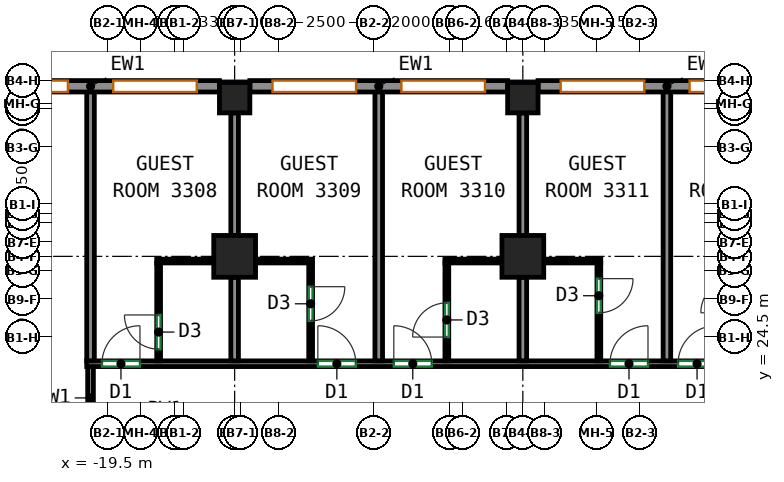
"""IFC4 building model, lengths in metres.
Left out: names, types, materials, properties, quantities, classifications, styles, units other than length and angle.
Written with IfcOpenShell. Run it as: python <this file> out.ifc"""

import sys

from ifc_helpers import new_model, si_unit, direction, frame, frame_2d, origin, origin_2d, place, context, subcontext, project, spatial, rectangle, extrude, source, transform, mapped, element, fill, save


model = new_model("IFC4")
c1 = context("Model", 3, precision=1e-05, world=origin(), true_north=direction((0.0, 1.0)))
c2 = subcontext(c1, "Body", "Model", "MODEL_VIEW")
j1 = project(units=[si_unit("LENGTHUNIT", "METRE"), si_unit("PLANEANGLEUNIT", "RADIAN")], contexts=[c1])
p1 = place(None, origin())
s1 = spatial("IfcSite", under=j1, at=p1, CompositionType="ELEMENT")
p2 = place(p1, origin())
s2 = spatial("IfcBuilding", under=s1, at=p2, CompositionType="ELEMENT")
p3 = place(p2, frame((0.0, 0.0, 147.3)))
s3 = spatial("IfcBuildingStorey", under=s2, at=p3, CompositionType="ELEMENT", Elevation=147.3)
m1 = source(origin(), c2, "Body", "SweptSolid", [
    extrude(rectangle(XDim=1.1, YDim=1.1, at=origin_2d()), origin(), (0.0, 0.0, 1.0), 3.12),
])
p4 = place(p3, frame((-16.167, 26.625, 0.0), z_axis=(0.0, 0.0, 1.0), x_axis=(1.0, 0.0, 0.0)))
e1 = element("IfcColumn", 1, at=p4, inside=s3, PredefinedType="COLUMN", context=c2, shape_type="MappedRepresentation", body=[
    mapped(m1, transform((0.0, 0.0, 0.0))),
])
m2 = source(origin(), c2, "Body", "SweptSolid", [
    extrude(rectangle(XDim=0.8, YDim=0.8, at=origin_2d()), origin(), (0.0, 0.0, 1.0), 3.12),
])
p5 = place(p3, frame((-16.167, 30.8, 0.0), z_axis=(0.0, 0.0, 1.0), x_axis=(1.0, 0.0, 0.0)))
e2 = element("IfcColumn", 2, at=p5, inside=s3, PredefinedType="COLUMN", context=c2, shape_type="MappedRepresentation", body=[
    mapped(m2, transform((0.0, 0.0, 0.0))),
])
p6 = place(p3, frame((-8.583, 26.625, 0.0), z_axis=(0.0, 0.0, 1.0), x_axis=(1.0, 0.0, 0.0)))
e3 = element("IfcColumn", 3, at=p6, inside=s3, PredefinedType="COLUMN", context=c2, shape_type="MappedRepresentation", body=[
    mapped(m1, transform((0.0, 0.0, 0.0))),
])
p7 = place(p3, frame((-8.583, 30.8, 0.0), z_axis=(0.0, 0.0, 1.0), x_axis=(1.0, 0.0, 0.0)))
e4 = element("IfcColumn", 4, at=p7, inside=s3, PredefinedType="COLUMN", context=c2, shape_type="MappedRepresentation", body=[
    mapped(m2, transform((0.0, 0.0, 0.0))),
])
m3 = source(origin(), c2, "Body", "SweptSolid", [
    extrude(rectangle(XDim=6.783, YDim=0.3, at=frame_2d((3.392, 0.0))), origin(), (0.0, 0.0, 1.0), 3.12),
])
p8 = place(p3, frame((-1.4, 31.1, 0.0), z_axis=(0.0, 0.0, 1.0), x_axis=(-1.0, 0.0, 0.0)))
e5 = element("IfcWall", 5, at=p8, inside=s3, PredefinedType="SOLIDWALL", context=c2, shape_type="MappedRepresentation", body=[
    mapped(m3, transform((0.0, 0.0, 0.0))),
])
p9 = place(p8, frame((0.596, 0.0, 0.85)))
e6 = element("IfcOpeningElement", 6, at=p9, cuts=e5, PredefinedType="OPENING", context=c2, shape_type="SweptSolid", body=[
    extrude(rectangle(XDim=2.2, YDim=1.95, at=frame_2d((1.1, 0.975))), frame((0.0, 0.16, 0.0), z_axis=(0.0, -1.0, 0.0), x_axis=(1.0, 0.0, 0.0)), (0.0, 0.0, 1.0), 0.32),
])
p10 = place(p8, frame((3.988, 0.0, 0.85)))
e7 = element("IfcOpeningElement", 7, at=p10, cuts=e5, PredefinedType="OPENING", context=c2, shape_type="SweptSolid", body=[
    extrude(rectangle(XDim=2.2, YDim=1.95, at=frame_2d((1.1, 0.975))), frame((0.0, 0.16, 0.0), z_axis=(0.0, -1.0, 0.0), x_axis=(1.0, 0.0, 0.0)), (0.0, 0.0, 1.0), 0.32),
])
m4 = source(origin(), c2, "Body", "SweptSolid", [
    extrude(rectangle(XDim=6.783, YDim=0.3, at=frame_2d((3.392, 0.0))), origin(), (0.0, 0.0, 1.0), 3.12),
])
p11 = place(p3, frame((-8.983, 31.1, 0.0), z_axis=(0.0, 0.0, 1.0), x_axis=(-1.0, 0.0, 0.0)))
e8 = element("IfcWall", 8, at=p11, inside=s3, PredefinedType="SOLIDWALL", context=c2, shape_type="MappedRepresentation", body=[
    mapped(m4, transform((0.0, 0.0, 0.0))),
])
p12 = place(p11, frame((0.596, 0.0, 0.85)))
e9 = element("IfcOpeningElement", 9, at=p12, cuts=e8, PredefinedType="OPENING", context=c2, shape_type="SweptSolid", body=[
    extrude(rectangle(XDim=2.2, YDim=1.95, at=frame_2d((1.1, 0.975))), frame((0.0, 0.16, 0.0), z_axis=(0.0, -1.0, 0.0), x_axis=(1.0, 0.0, 0.0)), (0.0, 0.0, 1.0), 0.32),
])
p13 = place(p11, frame((3.988, 0.0, 0.85)))
e10 = element("IfcOpeningElement", 10, at=p13, cuts=e8, PredefinedType="OPENING", context=c2, shape_type="SweptSolid", body=[
    extrude(rectangle(XDim=2.2, YDim=1.95, at=frame_2d((1.1, 0.975))), frame((0.0, 0.16, 0.0), z_axis=(0.0, -1.0, 0.0), x_axis=(1.0, 0.0, 0.0)), (0.0, 0.0, 1.0), 0.32),
])
p14 = place(p3, frame((-16.567, 31.1, 0.0), z_axis=(0.0, 0.0, 1.0), x_axis=(-1.0, 0.0, 0.0)))
e11 = element("IfcWall", 11, at=p14, inside=s3, PredefinedType="SOLIDWALL", context=c2, shape_type="MappedRepresentation", body=[
    mapped(m3, transform((0.0, 0.0, 0.0))),
])
p15 = place(p14, frame((0.596, 0.0, 0.85)))
e12 = element("IfcOpeningElement", 12, at=p15, cuts=e11, PredefinedType="OPENING", context=c2, shape_type="SweptSolid", body=[
    extrude(rectangle(XDim=2.2, YDim=1.95, at=frame_2d((1.1, 0.975))), frame((0.0, 0.16, 0.0), z_axis=(0.0, -1.0, 0.0), x_axis=(1.0, 0.0, 0.0)), (0.0, 0.0, 1.0), 0.32),
])
p16 = place(p14, frame((3.988, 0.0, 0.85)))
e13 = element("IfcOpeningElement", 13, at=p16, cuts=e11, PredefinedType="OPENING", context=c2, shape_type="SweptSolid", body=[
    extrude(rectangle(XDim=2.2, YDim=1.95, at=frame_2d((1.1, 0.975))), frame((0.0, 0.16, 0.0), z_axis=(0.0, -1.0, 0.0), x_axis=(1.0, 0.0, 0.0)), (0.0, 0.0, 1.0), 0.32),
])
p17 = place(p3, frame((-19.959, 22.075, 0.0), z_axis=(0.0, 0.0, 1.0), x_axis=(0.0, 1.0, 0.0)))
e14 = element("IfcWall", 14, at=p17, inside=s3, PredefinedType="PARTITIONING", context=c2, shape_type="SweptSolid", body=[
    extrude(rectangle(XDim=1.65, YDim=0.15, at=frame_2d((0.825, 0.0))), origin(), (0.0, 0.0, 1.0), 3.12),
])
p18 = place(p3, frame((-20.059, 23.8, 0.0), z_axis=(0.0, 0.0, 1.0), x_axis=(1.0, 0.0, 0.0)))
e15 = element("IfcWall", 15, at=p18, inside=s3, PredefinedType="PARTITIONING", context=c2, shape_type="SweptSolid", body=[
    extrude(rectangle(XDim=41.909, YDim=0.15, at=frame_2d((20.955, 0.0))), origin(), (0.0, 0.0, 1.0), 3.12),
])
p19 = place(p18, frame((0.401, 0.0, 0.0)))
e16 = element("IfcOpeningElement", 16, at=p19, cuts=e15, PredefinedType="OPENING", context=c2, shape_type="SweptSolid", body=[
    extrude(rectangle(XDim=1.0, YDim=2.1, at=frame_2d((0.5, 1.05))), frame((0.0, 0.085, 0.0), z_axis=(0.0, -1.0, 0.0), x_axis=(1.0, 0.0, 0.0)), (0.0, 0.0, 1.0), 0.17),
])
p20 = place(p18, frame((6.082, 0.0, 0.0)))
e17 = element("IfcOpeningElement", 17, at=p20, cuts=e15, PredefinedType="OPENING", context=c2, shape_type="SweptSolid", body=[
    extrude(rectangle(XDim=1.0, YDim=2.1, at=frame_2d((0.5, 1.05))), frame((0.0, 0.085, 0.0), z_axis=(0.0, -1.0, 0.0), x_axis=(1.0, 0.0, 0.0)), (0.0, 0.0, 1.0), 0.17),
])
p21 = place(p18, frame((8.08, 0.0, 0.0)))
e18 = element("IfcOpeningElement", 18, at=p21, cuts=e15, PredefinedType="OPENING", context=c2, shape_type="SweptSolid", body=[
    extrude(rectangle(XDim=1.0, YDim=2.1, at=frame_2d((0.5, 1.05))), frame((0.0, 0.085, 0.0), z_axis=(0.0, -1.0, 0.0), x_axis=(1.0, 0.0, 0.0)), (0.0, 0.0, 1.0), 0.17),
])
p22 = place(p18, frame((13.769, 0.0, 0.0)))
e19 = element("IfcOpeningElement", 19, at=p22, cuts=e15, PredefinedType="OPENING", context=c2, shape_type="SweptSolid", body=[
    extrude(rectangle(XDim=1.0, YDim=2.1, at=frame_2d((0.5, 1.05))), frame((0.0, 0.085, 0.0), z_axis=(0.0, -1.0, 0.0), x_axis=(1.0, 0.0, 0.0)), (0.0, 0.0, 1.0), 0.17),
])
p23 = place(p18, frame((15.56, 0.0, 0.0)))
e20 = element("IfcOpeningElement", 20, at=p23, cuts=e15, PredefinedType="OPENING", context=c2, shape_type="SweptSolid", body=[
    extrude(rectangle(XDim=1.0, YDim=2.1, at=frame_2d((0.5, 1.05))), frame((0.0, 0.085, 0.0), z_axis=(0.0, -1.0, 0.0), x_axis=(1.0, 0.0, 0.0)), (0.0, 0.0, 1.0), 0.17),
])
p24 = place(p18, frame((21.625, 0.0, 0.0)))
e21 = element("IfcOpeningElement", 21, at=p24, cuts=e15, PredefinedType="OPENING", context=c2, shape_type="SweptSolid", body=[
    extrude(rectangle(XDim=1.0, YDim=2.1, at=frame_2d((0.5, 1.05))), frame((0.0, 0.085, 0.0), z_axis=(0.0, -1.0, 0.0), x_axis=(1.0, 0.0, 0.0)), (0.0, 0.0, 1.0), 0.17),
])
p25 = place(p18, frame((23.212, 0.0, 0.0)))
e22 = element("IfcOpeningElement", 22, at=p25, cuts=e15, PredefinedType="OPENING", context=c2, shape_type="SweptSolid", body=[
    extrude(rectangle(XDim=1.0, YDim=2.1, at=frame_2d((0.5, 1.05))), frame((0.0, 0.085, 0.0), z_axis=(0.0, -1.0, 0.0), x_axis=(1.0, 0.0, 0.0)), (0.0, 0.0, 1.0), 0.17),
])
p26 = place(p18, frame((29.038, 0.0, 0.0)))
e23 = element("IfcOpeningElement", 23, at=p26, cuts=e15, PredefinedType="OPENING", context=c2, shape_type="SweptSolid", body=[
    extrude(rectangle(XDim=1.0, YDim=2.1, at=frame_2d((0.5, 1.05))), frame((0.0, 0.085, 0.0), z_axis=(0.0, -1.0, 0.0), x_axis=(1.0, 0.0, 0.0)), (0.0, 0.0, 1.0), 0.17),
])
p27 = place(p18, frame((30.624, 0.0, 0.0)))
e24 = element("IfcOpeningElement", 24, at=p27, cuts=e15, PredefinedType="OPENING", context=c2, shape_type="SweptSolid", body=[
    extrude(rectangle(XDim=1.0, YDim=2.1, at=frame_2d((0.5, 1.05))), frame((0.0, 0.085, 0.0), z_axis=(0.0, -1.0, 0.0), x_axis=(1.0, 0.0, 0.0)), (0.0, 0.0, 1.0), 0.17),
])
p28 = place(p18, frame((36.622, 0.0, 0.0)))
e25 = element("IfcOpeningElement", 25, at=p28, cuts=e15, PredefinedType="OPENING", context=c2, shape_type="SweptSolid", body=[
    extrude(rectangle(XDim=1.0, YDim=2.1, at=frame_2d((0.5, 1.05))), frame((0.0, 0.085, 0.0), z_axis=(0.0, -1.0, 0.0), x_axis=(1.0, 0.0, 0.0)), (0.0, 0.0, 1.0), 0.17),
])
p29 = place(p18, frame((38.516, 0.0, 0.0)))
e26 = element("IfcOpeningElement", 26, at=p29, cuts=e15, PredefinedType="OPENING", context=c2, shape_type="SweptSolid", body=[
    extrude(rectangle(XDim=1.0, YDim=2.1, at=frame_2d((0.5, 1.05))), frame((0.0, 0.085, 0.0), z_axis=(0.0, -1.0, 0.0), x_axis=(1.0, 0.0, 0.0)), (0.0, 0.0, 1.0), 0.17),
])
p30 = place(p3, frame((-19.959, 23.877, 0.0), z_axis=(0.0, 0.0, 1.0), x_axis=(0.0, 1.0, 0.0)))
e27 = element("IfcWall", 27, at=p30, inside=s3, PredefinedType="PARTITIONING", context=c2, shape_type="SweptSolid", body=[
    extrude(rectangle(XDim=7.123, YDim=0.2, at=frame_2d((3.562, 0.0))), origin(), (0.0, 0.0, 1.0), 3.12),
])
p31 = place(p3, frame((-18.217, 26.502, 0.0), z_axis=(0.0, 0.0, 1.0), x_axis=(1.0, 0.0, 0.0)))
e28 = element("IfcWall", 28, at=p31, inside=s3, PredefinedType="PARTITIONING", context=c2, shape_type="SweptSolid", body=[
    extrude(rectangle(XDim=1.5, YDim=0.1, at=frame_2d((0.75, 0.0))), origin(), (0.0, 0.0, 1.0), 3.12),
])
p32 = place(p3, frame((-18.167, 23.877, 0.0), z_axis=(0.0, 0.0, 1.0), x_axis=(0.0, 1.0, 0.0)))
e29 = element("IfcWall", 29, at=p32, inside=s3, PredefinedType="PARTITIONING", context=c2, shape_type="SweptSolid", body=[
    extrude(rectangle(XDim=2.575, YDim=0.1, at=frame_2d((1.288, 0.0))), origin(), (0.0, 0.0, 1.0), 3.12),
])
p33 = place(p32, frame((0.306, 0.0, 0.0)))
e30 = element("IfcOpeningElement", 30, at=p33, cuts=e29, PredefinedType="OPENING", context=c2, shape_type="SweptSolid", body=[
    extrude(rectangle(XDim=0.9, YDim=2.1, at=frame_2d((0.45, 1.05))), frame((0.0, 0.06, 0.0), z_axis=(0.0, -1.0, 0.0), x_axis=(1.0, 0.0, 0.0)), (0.0, 0.0, 1.0), 0.12),
])
p34 = place(p3, frame((-16.167, 27.175, 0.0), z_axis=(0.0, 0.0, 1.0), x_axis=(0.0, 1.0, 0.0)))
e31 = element("IfcWall", 31, at=p34, inside=s3, PredefinedType="PARTITIONING", context=c2, shape_type="SweptSolid", body=[
    extrude(rectangle(XDim=3.225, YDim=0.2, at=frame_2d((1.612, 0.0))), origin(), (0.0, 0.0, 1.0), 3.12),
])
p35 = place(p3, frame((-16.167, 23.877, 0.0), z_axis=(0.0, 0.0, 1.0), x_axis=(0.0, 1.0, 0.0)))
e32 = element("IfcWall", 32, at=p35, inside=s3, PredefinedType="PARTITIONING", context=c2, shape_type="SweptSolid", body=[
    extrude(rectangle(XDim=2.198, YDim=0.2, at=frame_2d((1.099, 0.0))), origin(), (0.0, 0.0, 1.0), 3.12),
])
p36 = place(p3, frame((-15.617, 26.502, 0.0), z_axis=(0.0, 0.0, 1.0), x_axis=(1.0, 0.0, 0.0)))
e33 = element("IfcWall", 33, at=p36, inside=s3, PredefinedType="PARTITIONING", context=c2, shape_type="SweptSolid", body=[
    extrude(rectangle(XDim=1.5, YDim=0.1, at=frame_2d((0.75, 0.0))), origin(), (0.0, 0.0, 1.0), 3.12),
])
p37 = place(p3, frame((-14.167, 26.452, 0.0), z_axis=(0.0, 0.0, 1.0), x_axis=(0.0, -1.0, 0.0)))
e34 = element("IfcWall", 34, at=p37, inside=s3, PredefinedType="PARTITIONING", context=c2, shape_type="SweptSolid", body=[
    extrude(rectangle(XDim=2.575, YDim=0.1, at=frame_2d((1.288, 0.0))), origin(), (0.0, 0.0, 1.0), 3.12),
])
p38 = place(p37, frame((0.625, 0.0, 0.0)))
e35 = element("IfcOpeningElement", 35, at=p38, cuts=e34, PredefinedType="OPENING", context=c2, shape_type="SweptSolid", body=[
    extrude(rectangle(XDim=0.9, YDim=2.1, at=frame_2d((0.45, 1.05))), frame((0.0, 0.06, 0.0), z_axis=(0.0, -1.0, 0.0), x_axis=(1.0, 0.0, 0.0)), (0.0, 0.0, 1.0), 0.12),
])
p39 = place(p3, frame((-12.375, 23.877, 0.0), z_axis=(0.0, 0.0, 1.0), x_axis=(0.0, 1.0, 0.0)))
e36 = element("IfcWall", 36, at=p39, inside=s3, PredefinedType="PARTITIONING", context=c2, shape_type="SweptSolid", body=[
    extrude(rectangle(XDim=7.123, YDim=0.2, at=frame_2d((3.562, 0.0))), origin(), (0.0, 0.0, 1.0), 3.12),
])
p40 = place(p3, frame((-10.633, 26.502, 0.0), z_axis=(0.0, 0.0, 1.0), x_axis=(1.0, 0.0, 0.0)))
e37 = element("IfcWall", 37, at=p40, inside=s3, PredefinedType="PARTITIONING", context=c2, shape_type="SweptSolid", body=[
    extrude(rectangle(XDim=1.5, YDim=0.1, at=frame_2d((0.75, 0.0))), origin(), (0.0, 0.0, 1.0), 3.12),
])
p41 = place(p3, frame((-10.583, 23.877, 0.0), z_axis=(0.0, 0.0, 1.0), x_axis=(0.0, 1.0, 0.0)))
e38 = element("IfcWall", 38, at=p41, inside=s3, PredefinedType="PARTITIONING", context=c2, shape_type="SweptSolid", body=[
    extrude(rectangle(XDim=2.575, YDim=0.1, at=frame_2d((1.288, 0.0))), origin(), (0.0, 0.0, 1.0), 3.12),
])
p42 = place(p41, frame((0.625, 0.0, 0.0)))
e39 = element("IfcOpeningElement", 39, at=p42, cuts=e38, PredefinedType="OPENING", context=c2, shape_type="SweptSolid", body=[
    extrude(rectangle(XDim=0.9, YDim=2.1, at=frame_2d((0.45, 1.05))), frame((0.0, 0.06, 0.0), z_axis=(0.0, -1.0, 0.0), x_axis=(1.0, 0.0, 0.0)), (0.0, 0.0, 1.0), 0.12),
])
p43 = place(p3, frame((-8.583, 27.175, 0.0), z_axis=(0.0, 0.0, 1.0), x_axis=(0.0, 1.0, 0.0)))
e40 = element("IfcWall", 40, at=p43, inside=s3, PredefinedType="PARTITIONING", context=c2, shape_type="SweptSolid", body=[
    extrude(rectangle(XDim=3.225, YDim=0.2, at=frame_2d((1.612, 0.0))), origin(), (0.0, 0.0, 1.0), 3.12),
])
p44 = place(p3, frame((-8.583, 23.877, 0.0), z_axis=(0.0, 0.0, 1.0), x_axis=(0.0, 1.0, 0.0)))
e41 = element("IfcWall", 41, at=p44, inside=s3, PredefinedType="PARTITIONING", context=c2, shape_type="SweptSolid", body=[
    extrude(rectangle(XDim=2.198, YDim=0.2, at=frame_2d((1.099, 0.0))), origin(), (0.0, 0.0, 1.0), 3.12),
])
p45 = place(p3, frame((-8.033, 26.502, 0.0), z_axis=(0.0, 0.0, 1.0), x_axis=(1.0, 0.0, 0.0)))
e42 = element("IfcWall", 42, at=p45, inside=s3, PredefinedType="PARTITIONING", context=c2, shape_type="SweptSolid", body=[
    extrude(rectangle(XDim=1.5, YDim=0.1, at=frame_2d((0.75, 0.0))), origin(), (0.0, 0.0, 1.0), 3.12),
])
p46 = place(p3, frame((-6.583, 26.452, 0.0), z_axis=(0.0, 0.0, 1.0), x_axis=(0.0, -1.0, 0.0)))
e43 = element("IfcWall", 43, at=p46, inside=s3, PredefinedType="PARTITIONING", context=c2, shape_type="SweptSolid", body=[
    extrude(rectangle(XDim=2.575, YDim=0.1, at=frame_2d((1.288, 0.0))), origin(), (0.0, 0.0, 1.0), 3.12),
])
p47 = place(p46, frame((0.413, 0.0, 0.0)))
e44 = element("IfcOpeningElement", 44, at=p47, cuts=e43, PredefinedType="OPENING", context=c2, shape_type="SweptSolid", body=[
    extrude(rectangle(XDim=0.9, YDim=2.1, at=frame_2d((0.45, 1.05))), frame((0.0, 0.06, 0.0), z_axis=(0.0, -1.0, 0.0), x_axis=(1.0, 0.0, 0.0)), (0.0, 0.0, 1.0), 0.12),
])
p48 = place(p3, frame((-4.792, 23.877, 0.0), z_axis=(0.0, 0.0, 1.0), x_axis=(0.0, 1.0, 0.0)))
e45 = element("IfcWall", 45, at=p48, inside=s3, PredefinedType="PARTITIONING", context=c2, shape_type="SweptSolid", body=[
    extrude(rectangle(XDim=7.123, YDim=0.2, at=frame_2d((3.562, 0.0))), origin(), (0.0, 0.0, 1.0), 3.12),
])
p49 = place(p9, origin())
e46 = element("IfcWindow", 46, at=p49, inside=s3, PartitioningType="SINGLE_PANEL", PredefinedType="WINDOW", context=c2, shape_type="SweptSolid", body=[
    extrude(rectangle(XDim=2.2, YDim=1.95, at=frame_2d((1.1, 0.975))), frame((0.0, 0.03, 0.0), z_axis=(0.0, -1.0, 0.0), x_axis=(1.0, 0.0, 0.0)), (0.0, 0.0, 1.0), 0.06),
])
fill(e6, e46)
p50 = place(p10, origin())
e47 = element("IfcWindow", 47, at=p50, inside=s3, PartitioningType="SINGLE_PANEL", PredefinedType="WINDOW", context=c2, shape_type="SweptSolid", body=[
    extrude(rectangle(XDim=2.2, YDim=1.95, at=frame_2d((1.1, 0.975))), frame((0.0, 0.03, 0.0), z_axis=(0.0, -1.0, 0.0), x_axis=(1.0, 0.0, 0.0)), (0.0, 0.0, 1.0), 0.06),
])
fill(e7, e47)
p51 = place(p12, origin())
e48 = element("IfcWindow", 48, at=p51, inside=s3, PartitioningType="SINGLE_PANEL", PredefinedType="WINDOW", context=c2, shape_type="SweptSolid", body=[
    extrude(rectangle(XDim=2.2, YDim=1.95, at=frame_2d((1.1, 0.975))), frame((0.0, 0.03, 0.0), z_axis=(0.0, -1.0, 0.0), x_axis=(1.0, 0.0, 0.0)), (0.0, 0.0, 1.0), 0.06),
])
fill(e9, e48)
p52 = place(p13, origin())
e49 = element("IfcWindow", 49, at=p52, inside=s3, PartitioningType="SINGLE_PANEL", PredefinedType="WINDOW", context=c2, shape_type="SweptSolid", body=[
    extrude(rectangle(XDim=2.2, YDim=1.95, at=frame_2d((1.1, 0.975))), frame((0.0, 0.03, 0.0), z_axis=(0.0, -1.0, 0.0), x_axis=(1.0, 0.0, 0.0)), (0.0, 0.0, 1.0), 0.06),
])
fill(e10, e49)
p53 = place(p15, origin())
e50 = element("IfcWindow", 50, at=p53, inside=s3, PartitioningType="SINGLE_PANEL", PredefinedType="WINDOW", context=c2, shape_type="SweptSolid", body=[
    extrude(rectangle(XDim=2.2, YDim=1.95, at=frame_2d((1.1, 0.975))), frame((0.0, 0.03, 0.0), z_axis=(0.0, -1.0, 0.0), x_axis=(1.0, 0.0, 0.0)), (0.0, 0.0, 1.0), 0.06),
])
fill(e12, e50)
p54 = place(p16, origin())
e51 = element("IfcWindow", 51, at=p54, inside=s3, PartitioningType="SINGLE_PANEL", PredefinedType="WINDOW", context=c2, shape_type="SweptSolid", body=[
    extrude(rectangle(XDim=2.2, YDim=1.95, at=frame_2d((1.1, 0.975))), frame((0.0, 0.03, 0.0), z_axis=(0.0, -1.0, 0.0), x_axis=(1.0, 0.0, 0.0)), (0.0, 0.0, 1.0), 0.06),
])
fill(e13, e51)
p55 = place(p19, origin())
e52 = element("IfcDoor", 52, at=p55, inside=s3, OperationType="SINGLE_SWING_RIGHT", PredefinedType="DOOR", context=c2, shape_type="SweptSolid", body=[
    extrude(rectangle(XDim=1.0, YDim=2.1, at=frame_2d((0.5, 1.05))), frame((0.0, 0.025, 0.0), z_axis=(0.0, -1.0, 0.0), x_axis=(1.0, 0.0, 0.0)), (0.0, 0.0, 1.0), 0.05),
])
fill(e16, e52)
p56 = place(p20, origin())
e53 = element("IfcDoor", 53, at=p56, inside=s3, OperationType="SINGLE_SWING_LEFT", PredefinedType="DOOR", context=c2, shape_type="SweptSolid", body=[
    extrude(rectangle(XDim=1.0, YDim=2.1, at=frame_2d((0.5, 1.05))), frame((0.0, 0.025, 0.0), z_axis=(0.0, -1.0, 0.0), x_axis=(1.0, 0.0, 0.0)), (0.0, 0.0, 1.0), 0.05),
])
fill(e17, e53)
p57 = place(p21, origin())
e54 = element("IfcDoor", 54, at=p57, inside=s3, OperationType="SINGLE_SWING_LEFT", PredefinedType="DOOR", context=c2, shape_type="SweptSolid", body=[
    extrude(rectangle(XDim=1.0, YDim=2.1, at=frame_2d((0.5, 1.05))), frame((0.0, 0.025, 0.0), z_axis=(0.0, -1.0, 0.0), x_axis=(1.0, 0.0, 0.0)), (0.0, 0.0, 1.0), 0.05),
])
fill(e18, e54)
p58 = place(p22, origin())
e55 = element("IfcDoor", 55, at=p58, inside=s3, OperationType="SINGLE_SWING_RIGHT", PredefinedType="DOOR", context=c2, shape_type="SweptSolid", body=[
    extrude(rectangle(XDim=1.0, YDim=2.1, at=frame_2d((0.5, 1.05))), frame((0.0, 0.025, 0.0), z_axis=(0.0, -1.0, 0.0), x_axis=(1.0, 0.0, 0.0)), (0.0, 0.0, 1.0), 0.05),
])
fill(e19, e55)
p59 = place(p23, origin())
e56 = element("IfcDoor", 56, at=p59, inside=s3, OperationType="SINGLE_SWING_RIGHT", PredefinedType="DOOR", context=c2, shape_type="SweptSolid", body=[
    extrude(rectangle(XDim=1.0, YDim=2.1, at=frame_2d((0.5, 1.05))), frame((0.0, 0.025, 0.0), z_axis=(0.0, -1.0, 0.0), x_axis=(1.0, 0.0, 0.0)), (0.0, 0.0, 1.0), 0.05),
])
fill(e20, e56)
p60 = place(p33, origin())
e57 = element("IfcDoor", 57, at=p60, inside=s3, OperationType="SINGLE_SWING_RIGHT", PredefinedType="DOOR", context=c2, shape_type="SweptSolid", body=[
    extrude(rectangle(XDim=0.9, YDim=2.1, at=frame_2d((0.45, 1.05))), frame((0.0, 0.025, 0.0), z_axis=(0.0, -1.0, 0.0), x_axis=(1.0, 0.0, 0.0)), (0.0, 0.0, 1.0), 0.05),
])
fill(e30, e57)
p61 = place(p42, origin())
e58 = element("IfcDoor", 58, at=p61, inside=s3, OperationType="SINGLE_SWING_LEFT", PredefinedType="DOOR", context=c2, shape_type="SweptSolid", body=[
    extrude(rectangle(XDim=0.9, YDim=2.1, at=frame_2d((0.45, 1.05))), frame((0.0, 0.025, 0.0), z_axis=(0.0, -1.0, 0.0), x_axis=(1.0, 0.0, 0.0)), (0.0, 0.0, 1.0), 0.05),
])
fill(e39, e58)
p62 = place(p38, origin())
e59 = element("IfcDoor", 59, at=p62, inside=s3, OperationType="SINGLE_SWING_LEFT", PredefinedType="DOOR", context=c2, shape_type="SweptSolid", body=[
    extrude(rectangle(XDim=0.9, YDim=2.1, at=frame_2d((0.45, 1.05))), frame((0.0, 0.025, 0.0), z_axis=(0.0, -1.0, 0.0), x_axis=(1.0, 0.0, 0.0)), (0.0, 0.0, 1.0), 0.05),
])
fill(e35, e59)
p63 = place(p47, origin())
e60 = element("IfcDoor", 60, at=p63, inside=s3, OperationType="SINGLE_SWING_LEFT", PredefinedType="DOOR", context=c2, shape_type="SweptSolid", body=[
    extrude(rectangle(XDim=0.9, YDim=2.1, at=frame_2d((0.45, 1.05))), frame((0.0, 0.025, 0.0), z_axis=(0.0, -1.0, 0.0), x_axis=(1.0, 0.0, 0.0)), (0.0, 0.0, 1.0), 0.05),
])
fill(e44, e60)
save(model, sys.argv[1])
